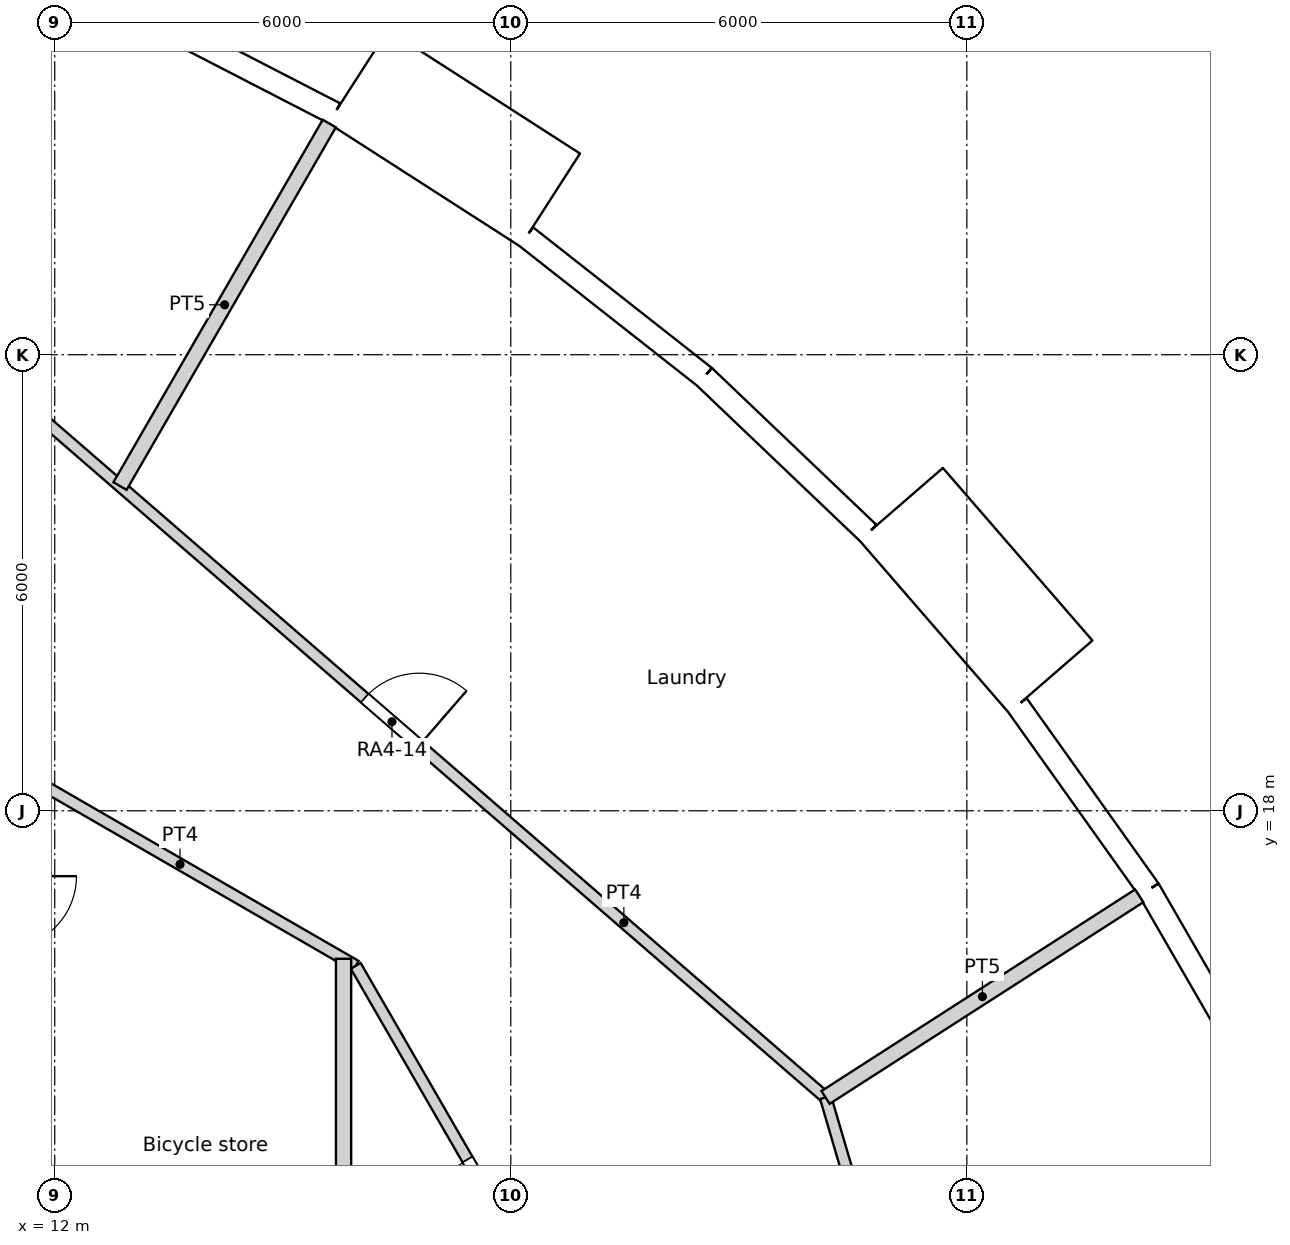
"""IFC4 building model, lengths in metres.
Left out: names, types, materials, properties, quantities, classifications, styles, units other than length and angle.
Written with IfcOpenShell. Run it as: python <this file> out.ifc"""

import sys

from ifc_helpers import new_model, si_unit, direction, frame, frame_2d, origin, origin_2d, place, context, subcontext, project, spatial, rectangle, circle, extrude, element, fill, save


model = new_model("IFC4")
c1 = context("Model", 3, precision=1e-05, world=origin(), true_north=direction((0.0, 1.0)))
c2 = subcontext(c1, "Body", "Model", "MODEL_VIEW")
j1 = project(units=[si_unit("LENGTHUNIT", "METRE"), si_unit("PLANEANGLEUNIT", "RADIAN")], contexts=[c1])
p1 = place(None, origin())
s1 = spatial("IfcSite", under=j1, at=p1, CompositionType="ELEMENT")
p2 = place(p1, origin())
s2 = spatial("IfcBuilding", under=s1, at=p2, CompositionType="ELEMENT")
p3 = place(p2, frame((0.0, 0.0, 60.6)))
s3 = spatial("IfcBuildingStorey", under=s2, at=p3, CompositionType="ELEMENT", Elevation=60.6)
for number, where, z_axis, x_axis in (
    (1, (25.469, 16.368, 0.0), (0.0, 0.0, 1.0), (1.0, 0.0, 0.0)),
    (2, (21.911, 20.892, 0.0), (0.0, 0.0, 1.0), (1.0, 0.0, 0.0)),
    (3, (17.561, 24.661, 0.0), (0.0, 0.0, 1.0), (1.0, 0.0, 0.0)),
    (4, (12.576, 27.539, 0.0), (0.0, 0.0, 1.0), (1.0, 0.0, 0.0)),
):
    element("IfcColumn", number, at=place(p3, frame(where, z_axis=z_axis, x_axis=x_axis)), inside=s3, PredefinedType="COLUMN", context=c2, shape_type="SweptSolid", body=[
        extrude(circle(Radius=0.7, at=origin_2d()), origin(), (0.0, 0.0, 1.0), 3.6),
    ])
for number, where, z_axis, x_axis in (
    (5, (18.805, 15.779, 0.0), (0.0, 0.0, 1.0), (1.0, 0.0, 0.0)),
    (6, (14.659, 19.69, 0.0), (0.0, 0.0, 1.0), (1.0, 0.0, 0.0)),
):
    element("IfcColumn", number, at=place(p3, frame(where, z_axis=z_axis, x_axis=x_axis)), inside=s3, PredefinedType="COLUMN", context=c2, shape_type="SweptSolid", body=[
        extrude(circle(Radius=0.75, at=origin_2d()), origin(), (0.0, 0.0, 1.0), 3.6),
    ])
p4 = place(p3, frame((11.735, 14.716, 0.0), z_axis=(0.0, 0.0, 1.0), x_axis=(1.0, 0.0, 0.0)))
e7 = element("IfcColumn", 7, at=p4, inside=s3, PredefinedType="COLUMN", context=c2, shape_type="SweptSolid", body=[
    extrude(circle(Radius=0.8, at=origin_2d()), origin(), (0.0, 0.0, 1.0), 3.6),
])
p5 = place(p3, frame((27.884, 14.382, 0.0), z_axis=(0.0, 0.0, 1.0), x_axis=(-0.500025049464, 0.866010940986, 0.0)))
e8 = element("IfcWall", 8, at=p5, inside=s3, PredefinedType="SOLIDWALL", context=c2, shape_type="SweptSolid", body=[
    extrude(rectangle(XDim=2.98, YDim=0.3, at=frame_2d((1.49, 0.0))), origin(), (0.0, 0.0, 1.0), 2.65),
])
p6 = place(p5, frame((1.49, 0.0, 1.55)))
e9 = element("IfcOpeningElement", 9, at=p6, cuts=e8, PredefinedType="OPENING", context=c2, shape_type="SweptSolid", body=[
    extrude(circle(Radius=0.9, at=origin_2d()), frame((0.0, 0.16, 0.0), z_axis=(0.0, -1.0, 0.0), x_axis=(1.0, 0.0, 0.0)), (0.0, 0.0, 1.0), 0.32),
])
p7 = place(p3, frame((26.394, 16.962, 0.0), z_axis=(0.0, 0.0, 1.0), x_axis=(-0.580059407678, 0.81457417315, 0.0)))
e10 = element("IfcWall", 10, at=p7, inside=s3, PredefinedType="SOLIDWALL", context=c2, shape_type="SweptSolid", body=[
    extrude(rectangle(XDim=2.979, YDim=0.3, at=frame_2d((1.49, 0.0))), origin(), (0.0, 0.0, 1.0), 3.15),
])
p8 = place(p7, frame((1.49, 0.0, 1.55)))
e11 = element("IfcOpeningElement", 11, at=p8, cuts=e10, PredefinedType="OPENING", context=c2, shape_type="SweptSolid", body=[
    extrude(circle(Radius=0.9, at=origin_2d()), frame((0.0, 0.16, 0.0), z_axis=(0.0, -1.0, 0.0), x_axis=(1.0, 0.0, 0.0)), (0.0, 0.0, 1.0), 0.32),
])
p9 = place(p3, frame((25.101, 19.766, -0.45), z_axis=(0.0, 0.0, 1.0), x_axis=(-0.654890259022, 0.75572398972, 0.0)))
e12 = element("IfcWall", 12, at=p9, inside=s3, PredefinedType="ELEMENTEDWALL", context=c2, shape_type="SweptSolid", body=[
    extrude(rectangle(XDim=3.0, YDim=1.45, at=frame_2d((1.5, 0.0))), origin(), (0.0, 0.0, 1.0), 3.6),
])
p10 = place(p9, frame((1.5, 0.0, 2.0)))
e13 = element("IfcOpeningElement", 13, at=p10, cuts=e12, PredefinedType="OPENING", context=c2, shape_type="SweptSolid", body=[
    extrude(circle(Radius=0.9, at=origin_2d()), frame((0.0, 0.735, 0.0), z_axis=(0.0, -1.0, 0.0), x_axis=(1.0, 0.0, 0.0)), (0.0, 0.0, 1.0), 1.47),
])
p11 = place(p3, frame((22.702, 21.655, 0.0), z_axis=(0.0, 0.0, 1.0), x_axis=(-0.723744206617, 0.690068346896, 0.0)))
e14 = element("IfcWall", 14, at=p11, inside=s3, PredefinedType="SOLIDWALL", context=c2, shape_type="SweptSolid", body=[
    extrude(rectangle(XDim=2.98, YDim=0.3, at=frame_2d((1.49, 0.0))), origin(), (0.0, 0.0, 1.0), 2.65),
])
p12 = place(p11, frame((1.49, 0.0, 1.55)))
e15 = element("IfcOpeningElement", 15, at=p12, cuts=e14, PredefinedType="OPENING", context=c2, shape_type="SweptSolid", body=[
    extrude(circle(Radius=0.9, at=origin_2d()), frame((0.0, 0.16, 0.0), z_axis=(0.0, -1.0, 0.0), x_axis=(1.0, 0.0, 0.0)), (0.0, 0.0, 1.0), 0.32),
])
p13 = place(p3, frame((20.546, 23.711, 0.0), z_axis=(0.0, 0.0, 1.0), x_axis=(-0.786045331304, 0.618168858108, 0.0)))
e16 = element("IfcWall", 16, at=p13, inside=s3, PredefinedType="SOLIDWALL", context=c2, shape_type="SweptSolid", body=[
    extrude(rectangle(XDim=2.98, YDim=0.3, at=frame_2d((1.49, 0.0))), origin(), (0.0, 0.0, 1.0), 3.15),
])
p14 = place(p13, frame((1.49, 0.0, 1.55)))
e17 = element("IfcOpeningElement", 17, at=p14, cuts=e16, PredefinedType="OPENING", context=c2, shape_type="SweptSolid", body=[
    extrude(circle(Radius=0.9, at=origin_2d()), frame((0.0, 0.16, 0.0), z_axis=(0.0, -1.0, 0.0), x_axis=(1.0, 0.0, 0.0)), (0.0, 0.0, 1.0), 0.32),
])
p15 = place(p3, frame((18.516, 26.037, -0.45), z_axis=(0.0, 0.0, 1.0), x_axis=(-0.841223422347, 0.540687667415, 0.0)))
e18 = element("IfcWall", 18, at=p15, inside=s3, PredefinedType="ELEMENTEDWALL", context=c2, shape_type="SweptSolid", body=[
    extrude(rectangle(XDim=3.0, YDim=1.45, at=frame_2d((1.5, 0.0))), origin(), (0.0, 0.0, 1.0), 3.6),
])
p16 = place(p15, frame((1.5, 0.0, 2.0)))
e19 = element("IfcOpeningElement", 19, at=p16, cuts=e18, PredefinedType="OPENING", context=c2, shape_type="SweptSolid", body=[
    extrude(circle(Radius=0.9, at=origin_2d()), frame((0.0, 0.735, 0.0), z_axis=(0.0, -1.0, 0.0), x_axis=(1.0, 0.0, 0.0)), (0.0, 0.0, 1.0), 1.47),
])
p17 = place(p3, frame((15.682, 27.174, 0.0), z_axis=(0.0, 0.0, 1.0), x_axis=(-0.888819853856, 0.458256770153, 0.0)))
e20 = element("IfcWall", 20, at=p17, inside=s3, PredefinedType="SOLIDWALL", context=c2, shape_type="SweptSolid", body=[
    extrude(rectangle(XDim=2.98, YDim=0.3, at=frame_2d((1.49, 0.0))), origin(), (0.0, 0.0, 1.0), 2.65),
])
p18 = place(p17, frame((1.49, 0.0, 1.55)))
e21 = element("IfcOpeningElement", 21, at=p18, cuts=e20, PredefinedType="OPENING", context=c2, shape_type="SweptSolid", body=[
    extrude(circle(Radius=0.9, at=origin_2d()), frame((0.0, 0.16, 0.0), z_axis=(0.0, -1.0, 0.0), x_axis=(1.0, 0.0, 0.0)), (0.0, 0.0, 1.0), 0.32),
])
p19 = place(p3, frame((15.96, 15.96, 0.0), z_axis=(0.0, 0.0, 1.0), x_axis=(0.499992689227, -0.86602962462, 0.0)))
e22 = element("IfcWall", 22, at=p19, inside=s3, PredefinedType="PARTITIONING", context=c2, shape_type="SweptSolid", body=[
    extrude(rectangle(XDim=6.882, YDim=0.15, at=frame_2d((3.441, 0.0))), origin(), (0.0, 0.0, 1.0), 3.15),
])
p20 = place(p19, frame((2.941, 0.0, 0.0)))
e23 = element("IfcOpeningElement", 23, at=p20, cuts=e22, PredefinedType="OPENING", context=c2, shape_type="SweptSolid", body=[
    extrude(rectangle(XDim=1.0, YDim=2.04, at=frame_2d((0.5, 1.02))), frame((0.0, 0.075, 0.0), z_axis=(0.0, -1.0, 0.0), x_axis=(1.0, 0.0, 0.0)), (0.0, 0.0, 1.0), 0.15),
])
p21 = place(p3, frame((22.141, 14.229, 0.0), z_axis=(0.0, 0.0, 1.0), x_axis=(0.281730446162, -0.959493593363, 0.0)))
e24 = element("IfcWall", 24, at=p21, inside=s3, PredefinedType="PARTITIONING", context=c2, shape_type="SweptSolid", body=[
    extrude(rectangle(XDim=14.83, YDim=0.15, at=frame_2d((7.415, 0.0))), origin(), (0.0, 0.0, 1.0), 3.15),
])
p22 = place(p21, frame((5.715, 0.0, 0.0)))
e25 = element("IfcOpeningElement", 25, at=p22, cuts=e24, PredefinedType="OPENING", context=c2, shape_type="SweptSolid", body=[
    extrude(rectangle(XDim=1.8, YDim=2.1, at=frame_2d((0.9, 1.05))), frame((0.0, 0.075, 0.0), z_axis=(0.0, -1.0, 0.0), x_axis=(1.0, 0.0, 0.0)), (0.0, 0.0, 1.0), 0.15),
])
p23 = place(p3, frame((10.933, 23.94, 0.0), z_axis=(0.0, 0.0, 1.0), x_axis=(0.755770011705, -0.654837147242, 0.0)))
e26 = element("IfcWall", 26, at=p23, inside=s3, PredefinedType="PARTITIONING", context=c2, shape_type="SweptSolid", body=[
    extrude(rectangle(XDim=14.83, YDim=0.15, at=frame_2d((7.415, 0.0))), origin(), (0.0, 0.0, 1.0), 3.15),
])
p24 = place(p23, frame((6.807, 0.0, 0.0)))
e27 = element("IfcOpeningElement", 27, at=p24, cuts=e26, PredefinedType="OPENING", context=c2, shape_type="SweptSolid", body=[
    extrude(rectangle(XDim=0.95, YDim=2.1, at=frame_2d((0.475, 1.05))), frame((0.0, 0.075, 0.0), z_axis=(0.0, -1.0, 0.0), x_axis=(1.0, 0.0, 0.0)), (0.0, 0.0, 1.0), 0.15),
])
p25 = place(p3, frame((11.336, 18.63, 0.0), z_axis=(0.0, 0.0, 1.0), x_axis=(0.866056911224, -0.499945423543, 0.0)))
e28 = element("IfcWall", 28, at=p25, inside=s3, PredefinedType="PARTITIONING", context=c2, shape_type="SweptSolid", body=[
    extrude(rectangle(XDim=5.339, YDim=0.15, at=frame_2d((2.67, 0.0))), origin(), (0.0, 0.0, 1.0), 3.15),
])
p26 = place(p3, frame((15.8, 10.0, 0.0), z_axis=(0.0, 0.0, 1.0), x_axis=(0.0, 1.0, 0.0)))
e29 = element("IfcWall", 29, at=p26, inside=s3, PredefinedType="PARTITIONING", context=c2, shape_type="SweptSolid", body=[
    extrude(rectangle(XDim=6.053, YDim=0.2, at=frame_2d((3.026, 0.0))), origin(), (0.0, 0.0, 1.0), 3.15),
])
p27 = place(p3, frame((22.141, 14.229, 0.0), z_axis=(0.0, 0.0, 1.0), x_axis=(0.841265781699, 0.540621757371, 0.0)))
e30 = element("IfcWall", 30, at=p27, inside=s3, PredefinedType="PARTITIONING", context=c2, shape_type="SweptSolid", body=[
    extrude(rectangle(XDim=4.906, YDim=0.2, at=frame_2d((2.453, 0.0))), origin(), (0.0, 0.0, 1.0), 3.15),
])
p28 = place(p3, frame((12.859, 22.272, 0.0), z_axis=(0.0, 0.0, 1.0), x_axis=(0.499968073049, 0.866043836033, 0.0)))
e31 = element("IfcWall", 31, at=p28, inside=s3, PredefinedType="PARTITIONING", context=c2, shape_type="SweptSolid", body=[
    extrude(rectangle(XDim=5.507, YDim=0.2, at=frame_2d((2.753, 0.0))), origin(), (0.0, 0.0, 1.0), 3.15),
])
p29 = place(p6, origin())
e32 = element("IfcWindow", 32, at=p29, inside=s3, PartitioningType="SINGLE_PANEL", PredefinedType="WINDOW", context=c2, shape_type="SweptSolid", body=[
    extrude(circle(Radius=0.9, at=origin_2d()), frame((0.0, 0.12, 0.0), z_axis=(0.0, -1.0, 0.0), x_axis=(1.0, 0.0, 0.0)), (0.0, 0.0, 1.0), 0.1),
])
fill(e9, e32)
p30 = place(p8, origin())
e33 = element("IfcWindow", 33, at=p30, inside=s3, PartitioningType="SINGLE_PANEL", PredefinedType="WINDOW", context=c2, shape_type="SweptSolid", body=[
    extrude(circle(Radius=0.9, at=origin_2d()), frame((0.0, 0.12, 0.0), z_axis=(0.0, -1.0, 0.0), x_axis=(1.0, 0.0, 0.0)), (0.0, 0.0, 1.0), 0.1),
])
fill(e11, e33)
p31 = place(p10, origin())
e34 = element("IfcWindow", 34, at=p31, inside=s3, PartitioningType="SINGLE_PANEL", PredefinedType="WINDOW", context=c2, shape_type="SweptSolid", body=[
    extrude(circle(Radius=0.9, at=origin_2d()), frame((0.0, 0.695, 0.0), z_axis=(0.0, -1.0, 0.0), x_axis=(1.0, 0.0, 0.0)), (0.0, 0.0, 1.0), 0.1),
])
fill(e13, e34)
p32 = place(p12, origin())
e35 = element("IfcWindow", 35, at=p32, inside=s3, PartitioningType="SINGLE_PANEL", PredefinedType="WINDOW", context=c2, shape_type="SweptSolid", body=[
    extrude(circle(Radius=0.9, at=origin_2d()), frame((0.0, 0.12, 0.0), z_axis=(0.0, -1.0, 0.0), x_axis=(1.0, 0.0, 0.0)), (0.0, 0.0, 1.0), 0.1),
])
fill(e15, e35)
p33 = place(p14, origin())
e36 = element("IfcWindow", 36, at=p33, inside=s3, PartitioningType="SINGLE_PANEL", PredefinedType="WINDOW", context=c2, shape_type="SweptSolid", body=[
    extrude(circle(Radius=0.9, at=origin_2d()), frame((0.0, 0.12, 0.0), z_axis=(0.0, -1.0, 0.0), x_axis=(1.0, 0.0, 0.0)), (0.0, 0.0, 1.0), 0.1),
])
fill(e17, e36)
p34 = place(p16, origin())
e37 = element("IfcWindow", 37, at=p34, inside=s3, PartitioningType="SINGLE_PANEL", PredefinedType="WINDOW", context=c2, shape_type="SweptSolid", body=[
    extrude(circle(Radius=0.9, at=origin_2d()), frame((0.0, 0.695, 0.0), z_axis=(0.0, -1.0, 0.0), x_axis=(1.0, 0.0, 0.0)), (0.0, 0.0, 1.0), 0.1),
])
fill(e19, e37)
p35 = place(p18, origin())
e38 = element("IfcWindow", 38, at=p35, inside=s3, PartitioningType="SINGLE_PANEL", PredefinedType="WINDOW", context=c2, shape_type="SweptSolid", body=[
    extrude(circle(Radius=0.9, at=origin_2d()), frame((0.0, 0.12, 0.0), z_axis=(0.0, -1.0, 0.0), x_axis=(1.0, 0.0, 0.0)), (0.0, 0.0, 1.0), 0.1),
])
fill(e21, e38)
p36 = place(p20, origin())
e39 = element("IfcDoor", 39, at=p36, inside=s3, OperationType="SINGLE_SWING_LEFT", PredefinedType="DOOR", context=c2, shape_type="SweptSolid", body=[
    extrude(rectangle(XDim=1.0, YDim=2.04, at=frame_2d((0.5, 1.02))), frame((0.0, 0.025, 0.0), z_axis=(0.0, -1.0, 0.0), x_axis=(1.0, 0.0, 0.0)), (0.0, 0.0, 1.0), 0.05),
])
fill(e23, e39)
p37 = place(p24, origin())
e40 = element("IfcDoor", 40, at=p37, inside=s3, OperationType="SINGLE_SWING_RIGHT", PredefinedType="DOOR", context=c2, shape_type="SweptSolid", body=[
    extrude(rectangle(XDim=0.95, YDim=2.1, at=frame_2d((0.475, 1.05))), frame((0.0, 0.025, 0.0), z_axis=(0.0, -1.0, 0.0), x_axis=(1.0, 0.0, 0.0)), (0.0, 0.0, 1.0), 0.05),
])
fill(e27, e40)
save(model, sys.argv[1])
